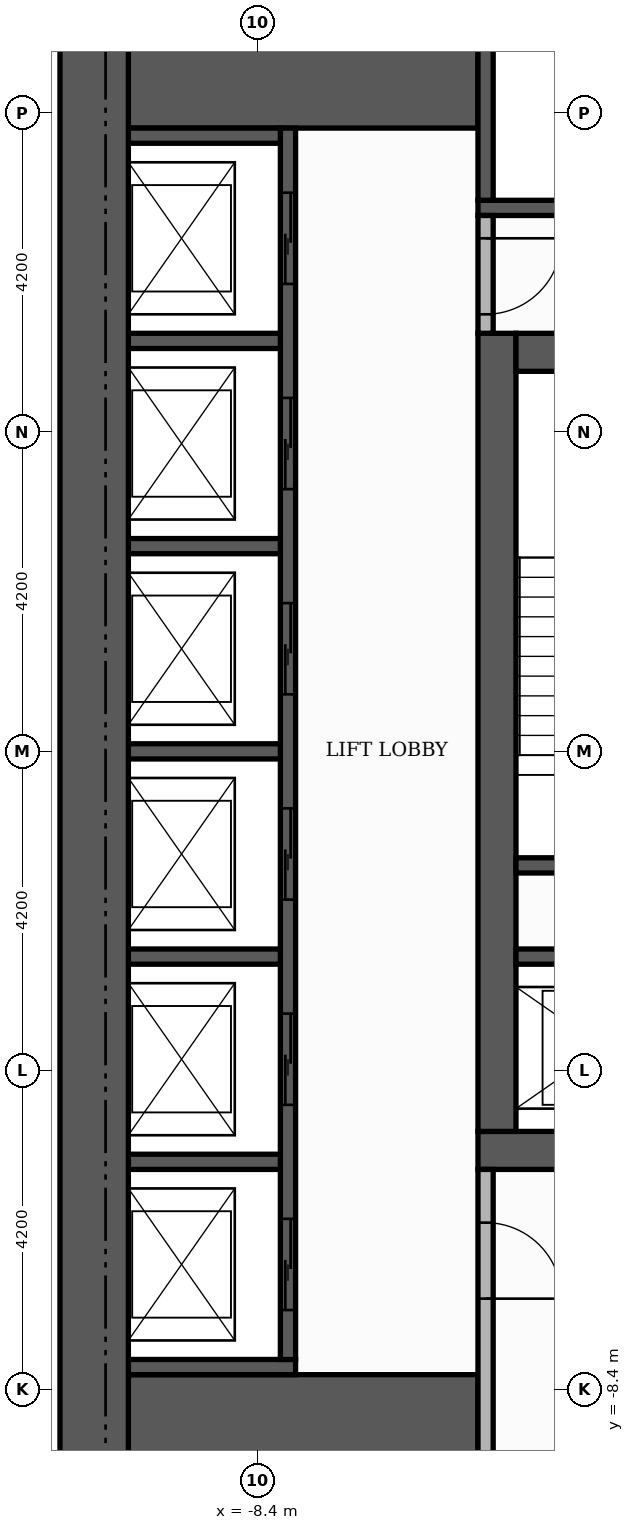
"""IFC4 building model, lengths in metres.
Left out: names, types, materials, properties, quantities, classifications, styles, units other than length and angle.
Written with IfcOpenShell. Run it as: python <this file> out.ifc"""

import sys

from ifc_helpers import new_model, si_unit, direction, frame, frame_2d, origin, place, context, subcontext, project, spatial, rectangle, extrude, element, fill, save


model = new_model("IFC4")
c1 = context("Model", 3, precision=1e-05, world=origin(), true_north=direction((0.0, 1.0)))
c2 = subcontext(c1, "Body", "Model", "MODEL_VIEW")
j1 = project(units=[si_unit("LENGTHUNIT", "METRE"), si_unit("PLANEANGLEUNIT", "RADIAN")], contexts=[c1])
p1 = place(None, origin())
s1 = spatial("IfcSite", under=j1, at=p1, CompositionType="ELEMENT")
p2 = place(p1, origin())
s2 = spatial("IfcBuilding", under=s1, at=p2, CompositionType="ELEMENT")
p3 = place(p2, frame((0.0, 0.0, 62.1)))
s3 = spatial("IfcBuildingStorey", under=s2, at=p3, CompositionType="ELEMENT", Elevation=62.1)
p4 = place(p3, frame((-5.5, -5.25, 0.0), z_axis=(0.0, 0.0, 1.0), x_axis=(1.0, 0.0, 0.0)))
e1 = element("IfcWall", 1, at=p4, inside=s3, PredefinedType="SHEAR", context=c2, shape_type="SweptSolid", body=[
    extrude(rectangle(XDim=11.0, YDim=0.5, at=frame_2d((5.5, 0.0))), origin(), (0.0, 0.0, 1.0), 3.48),
])
p5 = place(p4, frame((4.9, 0.0, 0.0)))
e2 = element("IfcOpeningElement", 2, at=p5, cuts=e1, PredefinedType="OPENING", context=c2, shape_type="SweptSolid", body=[
    extrude(rectangle(XDim=1.2, YDim=2.1, at=frame_2d((0.6, 1.05))), frame((0.0, 0.26, 0.0), z_axis=(0.0, -1.0, 0.0), x_axis=(1.0, 0.0, 0.0)), (0.0, 0.0, 1.0), 0.52),
])
p6 = place(p3, frame((-5.25, -5.0, 0.0), z_axis=(0.0, 0.0, 1.0), x_axis=(0.0, 1.0, 0.0)))
e3 = element("IfcWall", 3, at=p6, inside=s3, PredefinedType="SHEAR", context=c2, shape_type="SweptSolid", body=[
    extrude(rectangle(XDim=10.5, YDim=0.5, at=frame_2d((5.25, 0.0))), origin(), (0.0, 0.0, 1.0), 3.48),
])
p7 = place(p3, frame((-5.0, 5.25, 0.0), z_axis=(0.0, 0.0, 1.0), x_axis=(1.0, 0.0, 0.0)))
e4 = element("IfcWall", 4, at=p7, inside=s3, PredefinedType="SHEAR", context=c2, shape_type="SweptSolid", body=[
    extrude(rectangle(XDim=10.0, YDim=0.5, at=frame_2d((5.0, 0.0))), origin(), (0.0, 0.0, 1.0), 3.48),
])
p8 = place(p7, frame((4.4, 0.0, 0.0)))
e5 = element("IfcOpeningElement", 5, at=p8, cuts=e4, PredefinedType="OPENING", context=c2, shape_type="SweptSolid", body=[
    extrude(rectangle(XDim=1.2, YDim=2.1, at=frame_2d((0.6, 1.05))), frame((0.0, 0.26, 0.0), z_axis=(0.0, -1.0, 0.0), x_axis=(1.0, 0.0, 0.0)), (0.0, 0.0, 1.0), 0.52),
])
for number, where, z_axis, x_axis in (
    (6, (-10.1, -9.15, 0.0), (0.0, 0.0, 1.0), (1.0, 0.0, 0.0)),
    (7, (-10.1, 9.15, 0.0), (0.0, 0.0, 1.0), (1.0, 0.0, 0.0)),
):
    element("IfcWall", number, at=place(p3, frame(where, z_axis=z_axis, x_axis=x_axis)), inside=s3, PredefinedType="SHEAR", context=c2, shape_type="SweptSolid", body=[
        extrude(rectangle(XDim=4.6, YDim=1.9, at=frame_2d((2.3, 0.0))), origin(), (0.0, 0.0, 1.0), 3.48),
    ])
p9 = place(p3, frame((-5.0, -1.5, 0.0), z_axis=(0.0, 0.0, 1.0), x_axis=(1.0, 0.0, 0.0)))
e8 = element("IfcWall", 8, at=p9, inside=s3, PredefinedType="SHEAR", context=c2, shape_type="SweptSolid", body=[
    extrude(rectangle(XDim=3.05, YDim=0.2, at=frame_2d((1.525, 0.0))), origin(), (0.0, 0.0, 1.0), 3.48),
])
p10 = place(p3, frame((-5.5, 7.15, 0.0), z_axis=(0.0, 0.0, 1.0), x_axis=(1.0, 0.0, 0.0)))
e9 = element("IfcWall", 9, at=p10, inside=s3, PredefinedType="SHEAR", context=c2, shape_type="SweptSolid", body=[
    extrude(rectangle(XDim=6.8, YDim=0.2, at=frame_2d((3.4, 0.0))), origin(), (0.0, 0.0, 1.0), 3.48),
])
p11 = place(p3, frame((-5.4, 7.25, 0.0), z_axis=(0.0, 0.0, 1.0), x_axis=(0.0, 1.0, 0.0)))
e10 = element("IfcWall", 10, at=p11, inside=s3, PredefinedType="SHEAR", context=c2, shape_type="SweptSolid", body=[
    extrude(rectangle(XDim=2.85, YDim=0.2, at=frame_2d((1.425, 0.0))), origin(), (0.0, 0.0, 1.0), 3.48),
])
p12 = place(p3, frame((-10.1, -8.1, 0.0), z_axis=(0.0, 0.0, 1.0), x_axis=(1.0, 0.0, 0.0)))
e11 = element("IfcWall", 11, at=p12, inside=s3, PredefinedType="SHEAR", context=c2, shape_type="SweptSolid", body=[
    extrude(rectangle(XDim=2.2, YDim=0.2, at=frame_2d((1.1, 0.0))), origin(), (0.0, 0.0, 1.0), 3.48),
])
p13 = place(p3, frame((-8.0, -8.0, 0.0), z_axis=(0.0, 0.0, 1.0), x_axis=(0.0, 1.0, 0.0)))
e12 = element("IfcWall", 12, at=p13, inside=s3, PredefinedType="SHEAR", context=c2, shape_type="SweptSolid", body=[
    extrude(rectangle(XDim=16.2, YDim=0.2, at=frame_2d((8.1, 0.0))), origin(), (0.0, 0.0, 1.0), 3.48),
])
p14 = place(p13, frame((0.65, 0.0, 0.0)))
e13 = element("IfcOpeningElement", 13, at=p14, cuts=e12, PredefinedType="OPENING", context=c2, shape_type="SweptSolid", body=[
    extrude(rectangle(XDim=1.2, YDim=2.1, at=frame_2d((0.6, 1.05))), frame((0.0, 0.11, 0.0), z_axis=(0.0, -1.0, 0.0), x_axis=(1.0, 0.0, 0.0)), (0.0, 0.0, 1.0), 0.22),
])
p15 = place(p13, frame((3.35, 0.0, 0.0)))
e14 = element("IfcOpeningElement", 14, at=p15, cuts=e12, PredefinedType="OPENING", context=c2, shape_type="SweptSolid", body=[
    extrude(rectangle(XDim=1.2, YDim=2.1, at=frame_2d((0.6, 1.05))), frame((0.0, 0.11, 0.0), z_axis=(0.0, -1.0, 0.0), x_axis=(1.0, 0.0, 0.0)), (0.0, 0.0, 1.0), 0.22),
])
p16 = place(p13, frame((6.05, 0.0, 0.0)))
e15 = element("IfcOpeningElement", 15, at=p16, cuts=e12, PredefinedType="OPENING", context=c2, shape_type="SweptSolid", body=[
    extrude(rectangle(XDim=1.2, YDim=2.1, at=frame_2d((0.6, 1.05))), frame((0.0, 0.11, 0.0), z_axis=(0.0, -1.0, 0.0), x_axis=(1.0, 0.0, 0.0)), (0.0, 0.0, 1.0), 0.22),
])
p17 = place(p13, frame((8.75, 0.0, 0.0)))
e16 = element("IfcOpeningElement", 16, at=p17, cuts=e12, PredefinedType="OPENING", context=c2, shape_type="SweptSolid", body=[
    extrude(rectangle(XDim=1.2, YDim=2.1, at=frame_2d((0.6, 1.05))), frame((0.0, 0.11, 0.0), z_axis=(0.0, -1.0, 0.0), x_axis=(1.0, 0.0, 0.0)), (0.0, 0.0, 1.0), 0.22),
])
p18 = place(p13, frame((11.45, 0.0, 0.0)))
e17 = element("IfcOpeningElement", 17, at=p18, cuts=e12, PredefinedType="OPENING", context=c2, shape_type="SweptSolid", body=[
    extrude(rectangle(XDim=1.2, YDim=2.1, at=frame_2d((0.6, 1.05))), frame((0.0, 0.11, 0.0), z_axis=(0.0, -1.0, 0.0), x_axis=(1.0, 0.0, 0.0)), (0.0, 0.0, 1.0), 0.22),
])
p19 = place(p13, frame((14.15, 0.0, 0.0)))
e18 = element("IfcOpeningElement", 18, at=p19, cuts=e12, PredefinedType="OPENING", context=c2, shape_type="SweptSolid", body=[
    extrude(rectangle(XDim=1.2, YDim=2.1, at=frame_2d((0.6, 1.05))), frame((0.0, 0.11, 0.0), z_axis=(0.0, -1.0, 0.0), x_axis=(1.0, 0.0, 0.0)), (0.0, 0.0, 1.0), 0.22),
])
for number, where, z_axis, x_axis in (
    (19, (-10.1, -5.4, 0.0), (0.0, 0.0, 1.0), (1.0, 0.0, 0.0)),
    (20, (-10.1, -2.7, 0.0), (0.0, 0.0, 1.0), (1.0, 0.0, 0.0)),
):
    element("IfcWall", number, at=place(p3, frame(where, z_axis=z_axis, x_axis=x_axis)), inside=s3, PredefinedType="SHEAR", context=c2, shape_type="SweptSolid", body=[
        extrude(rectangle(XDim=2.0, YDim=0.2, at=frame_2d((1.0, 0.0))), origin(), (0.0, 0.0, 1.0), 3.48),
    ])
p20 = place(p3, frame((-5.0, -2.7, 0.0), z_axis=(0.0, 0.0, 1.0), x_axis=(1.0, 0.0, 0.0)))
e21 = element("IfcWall", 21, at=p20, inside=s3, PredefinedType="SHEAR", context=c2, shape_type="SweptSolid", body=[
    extrude(rectangle(XDim=2.85, YDim=0.2, at=frame_2d((1.425, 0.0))), origin(), (0.0, 0.0, 1.0), 3.48),
])
for number, where, z_axis, x_axis in (
    (22, (-10.1, 0.0, 0.0), (0.0, 0.0, 1.0), (1.0, 0.0, 0.0)),
    (23, (-10.1, 2.7, 0.0), (0.0, 0.0, 1.0), (1.0, 0.0, 0.0)),
    (24, (-10.1, 5.4, 0.0), (0.0, 0.0, 1.0), (1.0, 0.0, 0.0)),
    (25, (-10.1, 8.1, 0.0), (0.0, 0.0, 1.0), (1.0, 0.0, 0.0)),
):
    element("IfcWall", number, at=place(p3, frame(where, z_axis=z_axis, x_axis=x_axis)), inside=s3, PredefinedType="SHEAR", context=c2, shape_type="SweptSolid", body=[
        extrude(rectangle(XDim=2.0, YDim=0.2, at=frame_2d((1.0, 0.0))), origin(), (0.0, 0.0, 1.0), 3.48),
    ])
p21 = place(p3, frame((-10.55, -10.1, 0.0), z_axis=(0.0, 0.0, 1.0), x_axis=(0.0, 1.0, 0.0)))
e26 = element("IfcWall", 26, at=p21, inside=s3, PredefinedType="SHEAR", context=c2, shape_type="SweptSolid", body=[
    extrude(rectangle(XDim=20.2, YDim=0.9, at=frame_2d((10.1, 0.0))), origin(), (0.0, 0.0, 1.0), 3.48),
])
p22 = place(p3, frame((-5.4, -10.1, 0.0), z_axis=(0.0, 0.0, 1.0), x_axis=(0.0, 1.0, 0.0)))
e27 = element("IfcWall", 27, at=p22, inside=s3, PredefinedType="PARTITIONING", context=c2, shape_type="SweptSolid", body=[
    extrude(rectangle(XDim=4.6, YDim=0.2, at=frame_2d((2.3, 0.0))), origin(), (0.0, 0.0, 1.0), 3.48),
])
p23 = place(p22, frame((2.9, 0.0, 0.0)))
e28 = element("IfcOpeningElement", 28, at=p23, cuts=e27, PredefinedType="OPENING", context=c2, shape_type="SweptSolid", body=[
    extrude(rectangle(XDim=1.0, YDim=2.1, at=frame_2d((0.5, 1.05))), frame((0.0, 0.11, 0.0), z_axis=(0.0, -1.0, 0.0), x_axis=(1.0, 0.0, 0.0)), (0.0, 0.0, 1.0), 0.22),
])
p24 = place(p3, frame((-5.4, 5.5, 0.0), z_axis=(0.0, 0.0, 1.0), x_axis=(0.0, 1.0, 0.0)))
e29 = element("IfcWall", 29, at=p24, inside=s3, PredefinedType="PARTITIONING", context=c2, shape_type="SweptSolid", body=[
    extrude(rectangle(XDim=1.55, YDim=0.2, at=frame_2d((0.775, 0.0))), origin(), (0.0, 0.0, 1.0), 3.48),
])
p25 = place(p24, frame((0.25, 0.0, 0.0)))
e30 = element("IfcOpeningElement", 30, at=p25, cuts=e29, PredefinedType="OPENING", context=c2, shape_type="SweptSolid", body=[
    extrude(rectangle(XDim=1.0, YDim=2.1, at=frame_2d((0.5, 1.05))), frame((0.0, 0.11, 0.0), z_axis=(0.0, -1.0, 0.0), x_axis=(1.0, 0.0, 0.0)), (0.0, 0.0, 1.0), 0.22),
])
p26 = place(p14, origin())
e31 = element("IfcDoor", 31, at=p26, inside=s3, OperationType="SLIDING_TO_LEFT", PredefinedType="DOOR", context=c2, shape_type="SweptSolid", body=[
    extrude(rectangle(XDim=1.2, YDim=2.1, at=frame_2d((0.6, 1.05))), frame((0.0, 0.025, 0.0), z_axis=(0.0, -1.0, 0.0), x_axis=(1.0, 0.0, 0.0)), (0.0, 0.0, 1.0), 0.05),
])
fill(e13, e31)
p27 = place(p15, origin())
e32 = element("IfcDoor", 32, at=p27, inside=s3, OperationType="SLIDING_TO_LEFT", PredefinedType="DOOR", context=c2, shape_type="SweptSolid", body=[
    extrude(rectangle(XDim=1.2, YDim=2.1, at=frame_2d((0.6, 1.05))), frame((0.0, 0.025, 0.0), z_axis=(0.0, -1.0, 0.0), x_axis=(1.0, 0.0, 0.0)), (0.0, 0.0, 1.0), 0.05),
])
fill(e14, e32)
p28 = place(p16, origin())
e33 = element("IfcDoor", 33, at=p28, inside=s3, OperationType="SLIDING_TO_LEFT", PredefinedType="DOOR", context=c2, shape_type="SweptSolid", body=[
    extrude(rectangle(XDim=1.2, YDim=2.1, at=frame_2d((0.6, 1.05))), frame((0.0, 0.025, 0.0), z_axis=(0.0, -1.0, 0.0), x_axis=(1.0, 0.0, 0.0)), (0.0, 0.0, 1.0), 0.05),
])
fill(e15, e33)
p29 = place(p17, origin())
e34 = element("IfcDoor", 34, at=p29, inside=s3, OperationType="SLIDING_TO_LEFT", PredefinedType="DOOR", context=c2, shape_type="SweptSolid", body=[
    extrude(rectangle(XDim=1.2, YDim=2.1, at=frame_2d((0.6, 1.05))), frame((0.0, 0.025, 0.0), z_axis=(0.0, -1.0, 0.0), x_axis=(1.0, 0.0, 0.0)), (0.0, 0.0, 1.0), 0.05),
])
fill(e16, e34)
p30 = place(p18, origin())
e35 = element("IfcDoor", 35, at=p30, inside=s3, OperationType="SLIDING_TO_LEFT", PredefinedType="DOOR", context=c2, shape_type="SweptSolid", body=[
    extrude(rectangle(XDim=1.2, YDim=2.1, at=frame_2d((0.6, 1.05))), frame((0.0, 0.025, 0.0), z_axis=(0.0, -1.0, 0.0), x_axis=(1.0, 0.0, 0.0)), (0.0, 0.0, 1.0), 0.05),
])
fill(e17, e35)
p31 = place(p19, origin())
e36 = element("IfcDoor", 36, at=p31, inside=s3, OperationType="SLIDING_TO_LEFT", PredefinedType="DOOR", context=c2, shape_type="SweptSolid", body=[
    extrude(rectangle(XDim=1.2, YDim=2.1, at=frame_2d((0.6, 1.05))), frame((0.0, 0.025, 0.0), z_axis=(0.0, -1.0, 0.0), x_axis=(1.0, 0.0, 0.0)), (0.0, 0.0, 1.0), 0.05),
])
fill(e18, e36)
p32 = place(p25, frame((1.0, 0.0, 0.0), z_axis=(0.0, 0.0, 1.0), x_axis=(-1.0, 0.0, 0.0)))
e37 = element("IfcDoor", 37, at=p32, inside=s3, OperationType="SINGLE_SWING_RIGHT", PredefinedType="DOOR", context=c2, shape_type="SweptSolid", body=[
    extrude(rectangle(XDim=1.0, YDim=2.1, at=frame_2d((0.5, 1.05))), frame((0.0, 0.025, 0.0), z_axis=(0.0, -1.0, 0.0), x_axis=(1.0, 0.0, 0.0)), (0.0, 0.0, 1.0), 0.05),
])
fill(e30, e37)
p33 = place(p23, frame((1.0, 0.0, 0.0), z_axis=(0.0, 0.0, 1.0), x_axis=(-1.0, 0.0, 0.0)))
e38 = element("IfcDoor", 38, at=p33, inside=s3, OperationType="SINGLE_SWING_LEFT", PredefinedType="DOOR", context=c2, shape_type="SweptSolid", body=[
    extrude(rectangle(XDim=1.0, YDim=2.1, at=frame_2d((0.5, 1.05))), frame((0.0, 0.025, 0.0), z_axis=(0.0, -1.0, 0.0), x_axis=(1.0, 0.0, 0.0)), (0.0, 0.0, 1.0), 0.05),
])
fill(e28, e38)
save(model, sys.argv[1])
